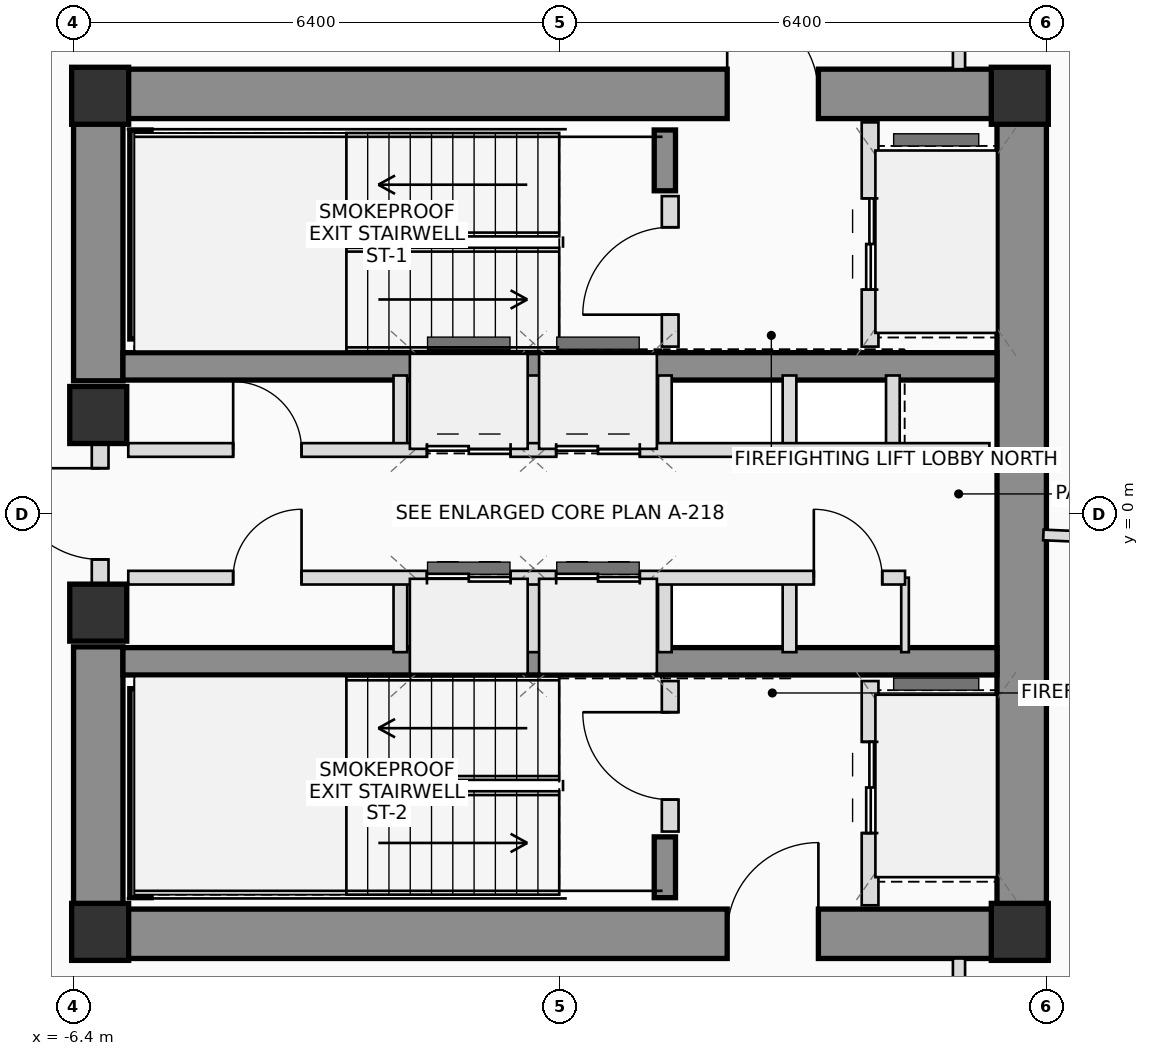
"""IFC4 building model, lengths in metres.
Left out: names, types, materials, properties, quantities, classifications, styles, units other than length and angle.
Written with IfcOpenShell. Run it as: python <this file> out.ifc"""

import sys

from ifc_helpers import new_model, si_unit, direction, frame, frame_2d, origin, origin_2d, place, context, subcontext, project, spatial, rectangle, extrude, source, transform, mapped, element, fill, save


model = new_model("IFC4")
c1 = context("Model", 3, precision=1e-05, world=origin(), true_north=direction((0.0, 1.0)))
c2 = subcontext(c1, "Body", "Model", "MODEL_VIEW")
j1 = project(units=[si_unit("LENGTHUNIT", "METRE"), si_unit("PLANEANGLEUNIT", "RADIAN")], contexts=[c1])
p1 = place(None, origin())
s1 = spatial("IfcSite", under=j1, at=p1, CompositionType="ELEMENT")
p2 = place(p1, origin())
s2 = spatial("IfcBuilding", under=s1, at=p2, CompositionType="ELEMENT")
p3 = place(p2, frame((0.0, 0.0, 194.9)))
s3 = spatial("IfcBuildingStorey", under=s2, at=p3, CompositionType="ELEMENT", Elevation=194.9)
m1 = source(origin(), c2, "Body", "SweptSolid", [
    extrude(rectangle(XDim=0.75, YDim=0.75, at=origin_2d()), origin(), (0.0, 0.0, 1.0), 3.45),
])
for number, where, z_axis, x_axis in (
    (1, (-6.05, -5.5, 0.0), (0.0, 0.0, 1.0), (1.0, 0.0, 0.0)),
    (2, (6.05, -5.5, 0.0), (0.0, 0.0, 1.0), (1.0, 0.0, 0.0)),
    (3, (6.05, 5.5, 0.0), (0.0, 0.0, 1.0), (1.0, 0.0, 0.0)),
    (4, (-6.05, 5.5, 0.0), (0.0, 0.0, 1.0), (1.0, 0.0, 0.0)),
):
    element("IfcColumn", number, at=place(p3, frame(where, z_axis=z_axis, x_axis=x_axis)), inside=s3, PredefinedType="COLUMN", context=c2, shape_type="MappedRepresentation", body=[
        mapped(m1, transform((0.0, 0.0, 0.0), scale=1.0)),
    ])
p4 = place(p3, frame((-6.4, 5.525, 0.0), z_axis=(0.0, 0.0, 1.0), x_axis=(1.0, 0.0, 0.0)))
e5 = element("IfcWall", 5, at=p4, inside=s3, PredefinedType="SHEAR", context=c2, shape_type="SweptSolid", body=[
    extrude(rectangle(XDim=12.8, YDim=0.65, at=frame_2d((6.4, 0.0))), origin(), (0.0, 0.0, 1.0), 3.45),
])
p5 = place(p4, frame((8.6, 0.0, 0.0)))
e6 = element("IfcOpeningElement", 6, at=p5, cuts=e5, PredefinedType="OPENING", context=c2, shape_type="SweptSolid", body=[
    extrude(rectangle(XDim=1.2, YDim=2.2, at=frame_2d((0.6, 1.1))), frame((0.0, 0.335, 0.0), z_axis=(0.0, -1.0, 0.0), x_axis=(1.0, 0.0, 0.0)), (0.0, 0.0, 1.0), 0.67),
])
p6 = place(p3, frame((-6.4, -5.525, 0.0), z_axis=(0.0, 0.0, 1.0), x_axis=(1.0, 0.0, 0.0)))
e7 = element("IfcWall", 7, at=p6, inside=s3, PredefinedType="SHEAR", context=c2, shape_type="SweptSolid", body=[
    extrude(rectangle(XDim=12.8, YDim=0.65, at=frame_2d((6.4, 0.0))), origin(), (0.0, 0.0, 1.0), 3.45),
])
p7 = place(p6, frame((8.6, 0.0, 0.0)))
e8 = element("IfcOpeningElement", 8, at=p7, cuts=e7, PredefinedType="OPENING", context=c2, shape_type="SweptSolid", body=[
    extrude(rectangle(XDim=1.2, YDim=2.2, at=frame_2d((0.6, 1.1))), frame((0.0, 0.335, 0.0), z_axis=(0.0, -1.0, 0.0), x_axis=(1.0, 0.0, 0.0)), (0.0, 0.0, 1.0), 0.67),
])
p8 = place(p3, frame((6.075, -5.2, 0.0), z_axis=(0.0, 0.0, 1.0), x_axis=(0.0, 1.0, 0.0)))
e9 = element("IfcWall", 9, at=p8, inside=s3, PredefinedType="SHEAR", context=c2, shape_type="SweptSolid", body=[
    extrude(rectangle(XDim=10.4, YDim=0.65, at=frame_2d((5.2, 0.0))), origin(), (0.0, 0.0, 1.0), 3.45),
])
for number, where, z_axis, x_axis in (
    (10, (-6.075, -5.2, 0.0), (0.0, 0.0, 1.0), (0.0, 1.0, 0.0)),
    (11, (-6.075, 1.75, 0.0), (0.0, 0.0, 1.0), (0.0, 1.0, 0.0)),
):
    element("IfcWall", number, at=place(p3, frame(where, z_axis=z_axis, x_axis=x_axis)), inside=s3, PredefinedType="SHEAR", context=c2, shape_type="SweptSolid", body=[
        extrude(rectangle(XDim=3.45, YDim=0.65, at=frame_2d((1.725, 0.0))), origin(), (0.0, 0.0, 1.0), 3.45),
    ])
for number, where, z_axis, x_axis in (
    (12, (-5.75, 1.94, 0.0), (0.0, 0.0, 1.0), (1.0, 0.0, 0.0)),
    (13, (-5.75, -1.94, 0.0), (0.0, 0.0, 1.0), (1.0, 0.0, 0.0)),
):
    element("IfcWall", number, at=place(p3, frame(where, z_axis=z_axis, x_axis=x_axis)), inside=s3, PredefinedType="SHEAR", context=c2, shape_type="SweptSolid", body=[
        extrude(rectangle(XDim=11.5, YDim=0.36, at=frame_2d((5.75, 0.0))), origin(), (0.0, 0.0, 1.0), 3.45),
    ])
p9 = place(p3, frame((-5.52, 2.3, 0.0), z_axis=(0.0, 0.0, 1.0), x_axis=(0.0, 1.0, 0.0)))
e14 = element("IfcWall", 14, at=p9, inside=s3, PredefinedType="SHEAR", context=c2, shape_type="SweptSolid", body=[
    extrude(rectangle(XDim=2.75, YDim=0.28, at=frame_2d((1.375, 0.0))), origin(), (0.0, 0.0, 1.0), 3.45),
])
p10 = place(p3, frame((1.38, 4.25, 0.0), z_axis=(0.0, 0.0, 1.0), x_axis=(0.0, 1.0, 0.0)))
e15 = element("IfcWall", 15, at=p10, inside=s3, PredefinedType="SHEAR", context=c2, shape_type="SweptSolid", body=[
    extrude(rectangle(XDim=0.8, YDim=0.28, at=frame_2d((0.4, 0.0))), origin(), (0.0, 0.0, 1.0), 3.45),
])
p11 = place(p3, frame((-5.52, -5.05, 0.0), z_axis=(0.0, 0.0, 1.0), x_axis=(0.0, 1.0, 0.0)))
e16 = element("IfcWall", 16, at=p11, inside=s3, PredefinedType="SHEAR", context=c2, shape_type="SweptSolid", body=[
    extrude(rectangle(XDim=2.75, YDim=0.28, at=frame_2d((1.375, 0.0))), origin(), (0.0, 0.0, 1.0), 3.45),
])
p12 = place(p3, frame((1.38, -5.05, 0.0), z_axis=(0.0, 0.0, 1.0), x_axis=(0.0, 1.0, 0.0)))
e17 = element("IfcWall", 17, at=p12, inside=s3, PredefinedType="SHEAR", context=c2, shape_type="SweptSolid", body=[
    extrude(rectangle(XDim=0.8, YDim=0.28, at=frame_2d((0.4, 0.0))), origin(), (0.0, 0.0, 1.0), 3.45),
])
for number, where, z_axis, x_axis in (
    (18, (-6.075, -1.3, 0.0), (0.0, 0.0, 1.0), (1.0, 0.0, 0.0)),
    (19, (-6.075, 1.3, 0.0), (0.0, 0.0, 1.0), (1.0, 0.0, 0.0)),
):
    element("IfcColumn", number, at=place(p3, frame(where, z_axis=z_axis, x_axis=x_axis)), inside=s3, PredefinedType="COLUMN", context=c2, shape_type="MappedRepresentation", body=[
        mapped(m1, transform((0.0, 0.0, 0.0), scale=1.0)),
    ])
p13 = place(p3, frame((-6.05, -0.95, 0.0), z_axis=(0.0, 0.0, 1.0), x_axis=(0.0, 1.0, 0.0)))
e20 = element("IfcWall", 20, at=p13, inside=s3, PredefinedType="PLUMBINGWALL", context=c2, shape_type="SweptSolid", body=[
    extrude(rectangle(XDim=1.9, YDim=0.22, at=frame_2d((0.95, 0.0))), origin(), (0.0, 0.0, 1.0), 2.23),
])
p14 = place(p13, frame((0.35, 0.0, 0.0)))
e21 = element("IfcOpeningElement", 21, at=p14, cuts=e20, PredefinedType="OPENING", context=c2, shape_type="SweptSolid", body=[
    extrude(rectangle(XDim=1.2, YDim=2.2, at=frame_2d((0.6, 1.1))), frame((0.0, 0.12, 0.0), z_axis=(0.0, -1.0, 0.0), x_axis=(1.0, 0.0, 0.0)), (0.0, 0.0, 1.0), 0.24),
])
p15 = place(p3, frame((1.45, 2.2, 0.0), z_axis=(0.0, 0.0, 1.0), x_axis=(0.0, 1.0, 0.0)))
e22 = element("IfcWall", 22, at=p15, inside=s3, PredefinedType="PLUMBINGWALL", context=c2, shape_type="SweptSolid", body=[
    extrude(rectangle(XDim=1.98, YDim=0.22, at=frame_2d((0.99, 0.0))), origin(), (0.0, 0.0, 1.0), 3.25),
])
p16 = place(p15, frame((0.42, 0.0, 0.0)))
e23 = element("IfcOpeningElement", 23, at=p16, cuts=e22, PredefinedType="OPENING", context=c2, shape_type="SweptSolid", body=[
    extrude(rectangle(XDim=1.15, YDim=2.15, at=frame_2d((0.575, 1.075))), frame((0.0, 0.12, 0.0), z_axis=(0.0, -1.0, 0.0), x_axis=(1.0, 0.0, 0.0)), (0.0, 0.0, 1.0), 0.24),
])
p17 = place(p3, frame((4.08, 2.2, 0.0), z_axis=(0.0, 0.0, 1.0), x_axis=(0.0, 1.0, 0.0)))
e24 = element("IfcWall", 24, at=p17, inside=s3, PredefinedType="PLUMBINGWALL", context=c2, shape_type="SweptSolid", body=[
    extrude(rectangle(XDim=2.95, YDim=0.22, at=frame_2d((1.475, 0.0))), origin(), (0.0, 0.0, 1.0), 3.25),
])
p18 = place(p17, frame((0.75, 0.0, 0.0)))
e25 = element("IfcOpeningElement", 25, at=p18, cuts=e24, PredefinedType="OPENING", context=c2, shape_type="SweptSolid", body=[
    extrude(rectangle(XDim=1.2, YDim=2.25, at=frame_2d((0.6, 1.125))), frame((0.0, 0.12, 0.0), z_axis=(0.0, -1.0, 0.0), x_axis=(1.0, 0.0, 0.0)), (0.0, 0.0, 1.0), 0.24),
])
p19 = place(p3, frame((1.45, -4.18, 0.0), z_axis=(0.0, 0.0, 1.0), x_axis=(0.0, 1.0, 0.0)))
e26 = element("IfcWall", 26, at=p19, inside=s3, PredefinedType="PLUMBINGWALL", context=c2, shape_type="SweptSolid", body=[
    extrude(rectangle(XDim=1.98, YDim=0.22, at=frame_2d((0.99, 0.0))), origin(), (0.0, 0.0, 1.0), 3.25),
])
p20 = place(p19, frame((0.42, 0.0, 0.0)))
e27 = element("IfcOpeningElement", 27, at=p20, cuts=e26, PredefinedType="OPENING", context=c2, shape_type="SweptSolid", body=[
    extrude(rectangle(XDim=1.15, YDim=2.15, at=frame_2d((0.575, 1.075))), frame((0.0, 0.12, 0.0), z_axis=(0.0, -1.0, 0.0), x_axis=(1.0, 0.0, 0.0)), (0.0, 0.0, 1.0), 0.24),
])
p21 = place(p3, frame((4.08, -5.15, 0.0), z_axis=(0.0, 0.0, 1.0), x_axis=(0.0, 1.0, 0.0)))
e28 = element("IfcWall", 28, at=p21, inside=s3, PredefinedType="PLUMBINGWALL", context=c2, shape_type="SweptSolid", body=[
    extrude(rectangle(XDim=2.95, YDim=0.22, at=frame_2d((1.475, 0.0))), origin(), (0.0, 0.0, 1.0), 3.25),
])
p22 = place(p21, frame((0.95, 0.0, 0.0)))
e29 = element("IfcOpeningElement", 29, at=p22, cuts=e28, PredefinedType="OPENING", context=c2, shape_type="SweptSolid", body=[
    extrude(rectangle(XDim=1.2, YDim=2.25, at=frame_2d((0.6, 1.125))), frame((0.0, 0.12, 0.0), z_axis=(0.0, -1.0, 0.0), x_axis=(1.0, 0.0, 0.0)), (0.0, 0.0, 1.0), 0.24),
])
for number, where, z_axis, x_axis in (
    (30, (-2.1, 0.84, 0.0), (0.0, 0.0, 1.0), (0.0, 1.0, 0.0)),
    (31, (-2.1, -1.82, 0.0), (0.0, 0.0, 1.0), (0.0, 1.0, 0.0)),
    (32, (-0.35, 0.84, 0.0), (0.0, 0.0, 1.0), (0.0, 1.0, 0.0)),
    (33, (-0.35, -1.82, 0.0), (0.0, 0.0, 1.0), (0.0, 1.0, 0.0)),
    (34, (1.38, 0.84, 0.0), (0.0, 0.0, 1.0), (0.0, 1.0, 0.0)),
    (35, (1.38, -1.82, 0.0), (0.0, 0.0, 1.0), (0.0, 1.0, 0.0)),
    (36, (3.02, 0.84, 0.0), (0.0, 0.0, 1.0), (0.0, 1.0, 0.0)),
    (37, (4.38, 0.84, 0.0), (0.0, 0.0, 1.0), (0.0, 1.0, 0.0)),
    (38, (3.02, -1.82, 0.0), (0.0, 0.0, 1.0), (0.0, 1.0, 0.0)),
):
    element("IfcWall", number, at=place(p3, frame(where, z_axis=z_axis, x_axis=x_axis)), inside=s3, PredefinedType="PLUMBINGWALL", context=c2, shape_type="SweptSolid", body=[
        extrude(rectangle(XDim=0.98, YDim=0.18, at=frame_2d((0.49, 0.0))), origin(), (0.0, 0.0, 1.0), 3.25),
    ])
p23 = place(p3, frame((4.54, -1.82, 0.0), z_axis=(0.0, 0.0, 1.0), x_axis=(0.0, 1.0, 0.0)))
e39 = element("IfcWall", 39, at=p23, inside=s3, PredefinedType="PARTITIONING", context=c2, shape_type="SweptSolid", body=[
    extrude(rectangle(XDim=0.98, YDim=0.1, at=frame_2d((0.49, 0.0))), origin(), (0.0, 0.0, 1.0), 3.25),
])
p24 = place(p3, frame((-5.68, 0.84, 0.0), z_axis=(0.0, 0.0, 1.0), x_axis=(1.0, 0.0, 0.0)))
e40 = element("IfcWall", 40, at=p24, inside=s3, PredefinedType="PLUMBINGWALL", context=c2, shape_type="SweptSolid", body=[
    extrude(rectangle(XDim=11.33, YDim=0.18, at=frame_2d((5.665, 0.0))), origin(), (0.0, 0.0, 1.0), 3.25),
])
p25 = place(p24, frame((1.38, 0.0, 0.0)))
e41 = element("IfcOpeningElement", 41, at=p25, cuts=e40, PredefinedType="OPENING", context=c2, shape_type="SweptSolid", body=[
    extrude(rectangle(XDim=0.9, YDim=2.05, at=frame_2d((0.45, 1.025))), frame((0.0, 0.1, 0.0), z_axis=(0.0, -1.0, 0.0), x_axis=(1.0, 0.0, 0.0)), (0.0, 0.0, 1.0), 0.2),
])
p26 = place(p24, frame((3.93, 0.0, 0.0)))
e42 = element("IfcOpeningElement", 42, at=p26, cuts=e40, PredefinedType="OPENING", context=c2, shape_type="SweptSolid", body=[
    extrude(rectangle(XDim=1.1, YDim=2.2, at=frame_2d((0.55, 1.1))), frame((0.0, 0.1, 0.0), z_axis=(0.0, -1.0, 0.0), x_axis=(1.0, 0.0, 0.0)), (0.0, 0.0, 1.0), 0.2),
])
p27 = place(p24, frame((5.63, 0.0, 0.0)))
e43 = element("IfcOpeningElement", 43, at=p27, cuts=e40, PredefinedType="OPENING", context=c2, shape_type="SweptSolid", body=[
    extrude(rectangle(XDim=1.1, YDim=2.2, at=frame_2d((0.55, 1.1))), frame((0.0, 0.1, 0.0), z_axis=(0.0, -1.0, 0.0), x_axis=(1.0, 0.0, 0.0)), (0.0, 0.0, 1.0), 0.2),
])
p28 = place(p3, frame((-5.68, -0.84, 0.0), z_axis=(0.0, 0.0, 1.0), x_axis=(1.0, 0.0, 0.0)))
e44 = element("IfcWall", 44, at=p28, inside=s3, PredefinedType="PLUMBINGWALL", context=c2, shape_type="SweptSolid", body=[
    extrude(rectangle(XDim=10.22, YDim=0.18, at=frame_2d((5.11, 0.0))), origin(), (0.0, 0.0, 1.0), 3.25),
])
p29 = place(p28, frame((1.38, 0.0, 0.0)))
e45 = element("IfcOpeningElement", 45, at=p29, cuts=e44, PredefinedType="OPENING", context=c2, shape_type="SweptSolid", body=[
    extrude(rectangle(XDim=0.9, YDim=2.05, at=frame_2d((0.45, 1.025))), frame((0.0, 0.1, 0.0), z_axis=(0.0, -1.0, 0.0), x_axis=(1.0, 0.0, 0.0)), (0.0, 0.0, 1.0), 0.2),
])
p30 = place(p28, frame((3.93, 0.0, 0.0)))
e46 = element("IfcOpeningElement", 46, at=p30, cuts=e44, PredefinedType="OPENING", context=c2, shape_type="SweptSolid", body=[
    extrude(rectangle(XDim=1.1, YDim=2.2, at=frame_2d((0.55, 1.1))), frame((0.0, 0.1, 0.0), z_axis=(0.0, -1.0, 0.0), x_axis=(1.0, 0.0, 0.0)), (0.0, 0.0, 1.0), 0.2),
])
p31 = place(p28, frame((5.63, 0.0, 0.0)))
e47 = element("IfcOpeningElement", 47, at=p31, cuts=e44, PredefinedType="OPENING", context=c2, shape_type="SweptSolid", body=[
    extrude(rectangle(XDim=1.1, YDim=2.2, at=frame_2d((0.55, 1.1))), frame((0.0, 0.1, 0.0), z_axis=(0.0, -1.0, 0.0), x_axis=(1.0, 0.0, 0.0)), (0.0, 0.0, 1.0), 0.2),
])
p32 = place(p28, frame((9.02, 0.0, 0.0)))
e48 = element("IfcOpeningElement", 48, at=p32, cuts=e44, PredefinedType="OPENING", context=c2, shape_type="SweptSolid", body=[
    extrude(rectangle(XDim=0.9, YDim=2.05, at=frame_2d((0.45, 1.025))), frame((0.0, 0.1, 0.0), z_axis=(0.0, -1.0, 0.0), x_axis=(1.0, 0.0, 0.0)), (0.0, 0.0, 1.0), 0.2),
])
p33 = place(p3, frame((5.25, 7.5, 0.0), z_axis=(0.0, 0.0, 1.0), x_axis=(0.0, -1.0, 0.0)))
e49 = element("IfcWall", 49, at=p33, inside=s3, PredefinedType="PARTITIONING", context=c2, shape_type="SweptSolid", body=[
    extrude(rectangle(XDim=1.65, YDim=0.16, at=frame_2d((0.825, 0.0))), origin(), (0.0, 0.0, 1.0), 2.605),
])
p34 = place(p3, frame((5.25, -5.85, 0.0), z_axis=(0.0, 0.0, 1.0), x_axis=(0.0, -1.0, 0.0)))
e50 = element("IfcWall", 50, at=p34, inside=s3, PredefinedType="PARTITIONING", context=c2, shape_type="SweptSolid", body=[
    extrude(rectangle(XDim=1.65, YDim=0.16, at=frame_2d((0.825, 0.0))), origin(), (0.0, 0.0, 1.0), 3.25),
])
p35 = place(p3, frame((6.36, -0.278, 0.0), z_axis=(0.0, 0.0, 1.0), x_axis=(0.999047276506, -0.04364102778, 0.0)))
e51 = element("IfcWall", 51, at=p35, inside=s3, PredefinedType="PARTITIONING", context=c2, shape_type="SweptSolid", body=[
    extrude(rectangle(XDim=7.642, YDim=0.14, at=frame_2d((3.821, 0.0))), origin(), (0.0, 0.0, 1.0), 2.605),
])
p36 = place(p5, origin())
e52 = element("IfcDoor", 52, at=p36, inside=s3, OperationType="SINGLE_SWING_LEFT", PredefinedType="DOOR", context=c2, shape_type="SweptSolid", body=[
    extrude(rectangle(XDim=1.2, YDim=2.2, at=frame_2d((0.6, 1.1))), frame((0.0, 0.025, 0.0), z_axis=(0.0, -1.0, 0.0), x_axis=(1.0, 0.0, 0.0)), (0.0, 0.0, 1.0), 0.05),
])
fill(e6, e52)
p37 = place(p7, origin())
e53 = element("IfcDoor", 53, at=p37, inside=s3, OperationType="SINGLE_SWING_RIGHT", PredefinedType="DOOR", context=c2, shape_type="SweptSolid", body=[
    extrude(rectangle(XDim=1.2, YDim=2.2, at=frame_2d((0.6, 1.1))), frame((0.0, 0.025, 0.0), z_axis=(0.0, -1.0, 0.0), x_axis=(1.0, 0.0, 0.0)), (0.0, 0.0, 1.0), 0.05),
])
fill(e8, e53)
p38 = place(p14, origin())
e54 = element("IfcDoor", 54, at=p38, inside=s3, OperationType="SINGLE_SWING_RIGHT", PredefinedType="DOOR", context=c2, shape_type="SweptSolid", body=[
    extrude(rectangle(XDim=1.2, YDim=2.2, at=frame_2d((0.6, 1.1))), frame((0.0, 0.025, 0.0), z_axis=(0.0, -1.0, 0.0), x_axis=(1.0, 0.0, 0.0)), (0.0, 0.0, 1.0), 0.05),
])
fill(e21, e54)
p39 = place(p16, origin())
e55 = element("IfcDoor", 55, at=p39, inside=s3, OperationType="SINGLE_SWING_LEFT", PredefinedType="DOOR", context=c2, shape_type="SweptSolid", body=[
    extrude(rectangle(XDim=1.15, YDim=2.15, at=frame_2d((0.575, 1.075))), frame((0.0, 0.025, 0.0), z_axis=(0.0, -1.0, 0.0), x_axis=(1.0, 0.0, 0.0)), (0.0, 0.0, 1.0), 0.05),
])
fill(e23, e55)
p40 = place(p18, origin())
e56 = element("IfcDoor", 56, at=p40, inside=s3, OperationType="DOUBLE_DOOR_SLIDING", PredefinedType="DOOR", context=c2, shape_type="SweptSolid", body=[
    extrude(rectangle(XDim=1.2, YDim=2.25, at=frame_2d((0.6, 1.125))), frame((0.0, 0.025, 0.0), z_axis=(0.0, -1.0, 0.0), x_axis=(1.0, 0.0, 0.0)), (0.0, 0.0, 1.0), 0.05),
])
fill(e25, e56)
p41 = place(p20, origin())
e57 = element("IfcDoor", 57, at=p41, inside=s3, OperationType="SINGLE_SWING_RIGHT", PredefinedType="DOOR", context=c2, shape_type="SweptSolid", body=[
    extrude(rectangle(XDim=1.15, YDim=2.15, at=frame_2d((0.575, 1.075))), frame((0.0, 0.025, 0.0), z_axis=(0.0, -1.0, 0.0), x_axis=(1.0, 0.0, 0.0)), (0.0, 0.0, 1.0), 0.05),
])
fill(e27, e57)
p42 = place(p22, origin())
e58 = element("IfcDoor", 58, at=p42, inside=s3, OperationType="DOUBLE_DOOR_SLIDING", PredefinedType="DOOR", context=c2, shape_type="SweptSolid", body=[
    extrude(rectangle(XDim=1.2, YDim=2.25, at=frame_2d((0.6, 1.125))), frame((0.0, 0.025, 0.0), z_axis=(0.0, -1.0, 0.0), x_axis=(1.0, 0.0, 0.0)), (0.0, 0.0, 1.0), 0.05),
])
fill(e29, e58)
p43 = place(p25, origin())
e59 = element("IfcDoor", 59, at=p43, inside=s3, OperationType="SINGLE_SWING_LEFT", PredefinedType="DOOR", context=c2, shape_type="SweptSolid", body=[
    extrude(rectangle(XDim=0.9, YDim=2.05, at=frame_2d((0.45, 1.025))), frame((0.0, 0.025, 0.0), z_axis=(0.0, -1.0, 0.0), x_axis=(1.0, 0.0, 0.0)), (0.0, 0.0, 1.0), 0.05),
])
fill(e41, e59)
p44 = place(p26, origin())
e60 = element("IfcDoor", 60, at=p44, inside=s3, OperationType="DOUBLE_DOOR_SLIDING", PredefinedType="DOOR", context=c2, shape_type="SweptSolid", body=[
    extrude(rectangle(XDim=1.1, YDim=2.2, at=frame_2d((0.55, 1.1))), frame((0.0, 0.025, 0.0), z_axis=(0.0, -1.0, 0.0), x_axis=(1.0, 0.0, 0.0)), (0.0, 0.0, 1.0), 0.05),
])
fill(e42, e60)
p45 = place(p27, origin())
e61 = element("IfcDoor", 61, at=p45, inside=s3, OperationType="DOUBLE_DOOR_SLIDING", PredefinedType="DOOR", context=c2, shape_type="SweptSolid", body=[
    extrude(rectangle(XDim=1.1, YDim=2.2, at=frame_2d((0.55, 1.1))), frame((0.0, 0.025, 0.0), z_axis=(0.0, -1.0, 0.0), x_axis=(1.0, 0.0, 0.0)), (0.0, 0.0, 1.0), 0.05),
])
fill(e43, e61)
p46 = place(p29, origin())
e62 = element("IfcDoor", 62, at=p46, inside=s3, OperationType="SINGLE_SWING_RIGHT", PredefinedType="DOOR", context=c2, shape_type="SweptSolid", body=[
    extrude(rectangle(XDim=0.9, YDim=2.05, at=frame_2d((0.45, 1.025))), frame((0.0, 0.025, 0.0), z_axis=(0.0, -1.0, 0.0), x_axis=(1.0, 0.0, 0.0)), (0.0, 0.0, 1.0), 0.05),
])
fill(e45, e62)
p47 = place(p30, origin())
e63 = element("IfcDoor", 63, at=p47, inside=s3, OperationType="DOUBLE_DOOR_SLIDING", PredefinedType="DOOR", context=c2, shape_type="SweptSolid", body=[
    extrude(rectangle(XDim=1.1, YDim=2.2, at=frame_2d((0.55, 1.1))), frame((0.0, 0.025, 0.0), z_axis=(0.0, -1.0, 0.0), x_axis=(1.0, 0.0, 0.0)), (0.0, 0.0, 1.0), 0.05),
])
fill(e46, e63)
p48 = place(p31, origin())
e64 = element("IfcDoor", 64, at=p48, inside=s3, OperationType="DOUBLE_DOOR_SLIDING", PredefinedType="DOOR", context=c2, shape_type="SweptSolid", body=[
    extrude(rectangle(XDim=1.1, YDim=2.2, at=frame_2d((0.55, 1.1))), frame((0.0, 0.025, 0.0), z_axis=(0.0, -1.0, 0.0), x_axis=(1.0, 0.0, 0.0)), (0.0, 0.0, 1.0), 0.05),
])
fill(e47, e64)
p49 = place(p32, origin())
e65 = element("IfcDoor", 65, at=p49, inside=s3, OperationType="SINGLE_SWING_LEFT", PredefinedType="DOOR", context=c2, shape_type="SweptSolid", body=[
    extrude(rectangle(XDim=0.9, YDim=2.05, at=frame_2d((0.45, 1.025))), frame((0.0, 0.025, 0.0), z_axis=(0.0, -1.0, 0.0), x_axis=(1.0, 0.0, 0.0)), (0.0, 0.0, 1.0), 0.05),
])
fill(e48, e65)
save(model, sys.argv[1])
